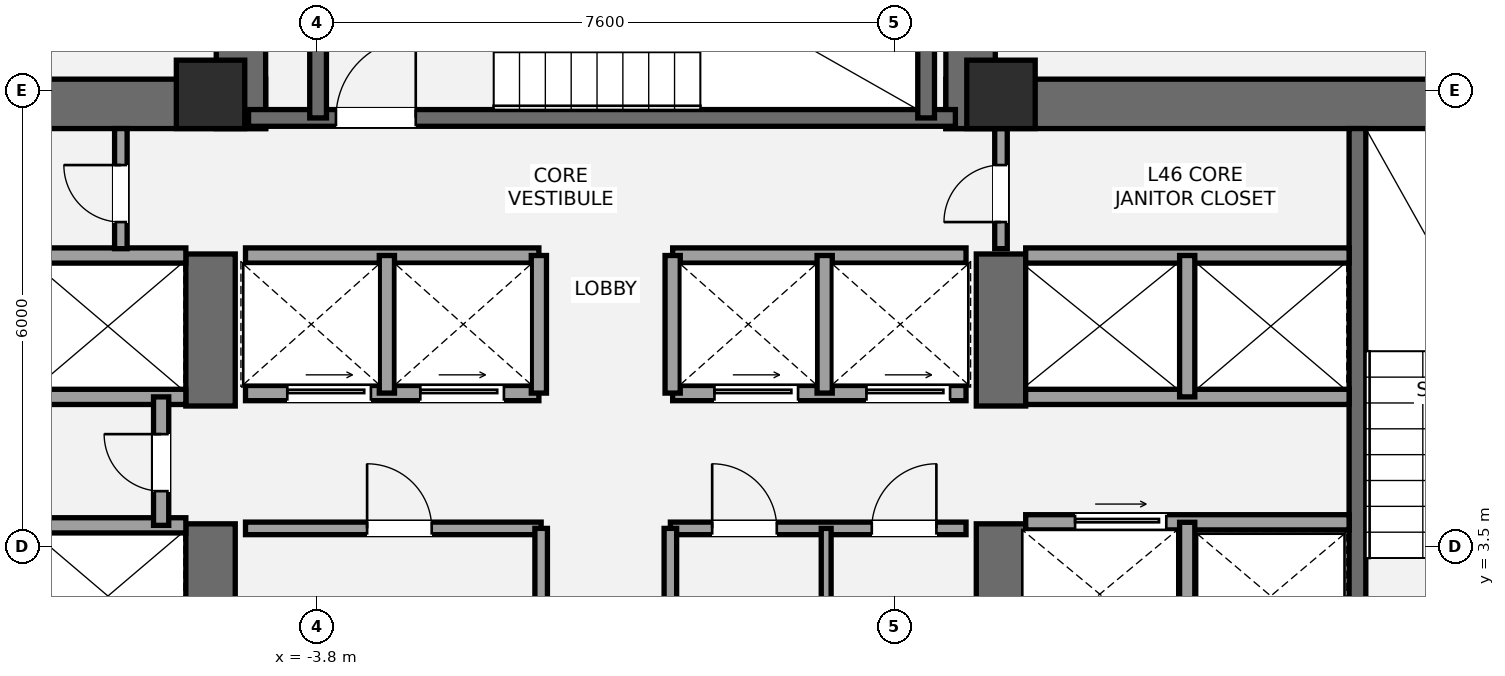
"""IFC4 building model, lengths in metres.
Left out: names, types, materials, properties, quantities, classifications, styles, units other than length and angle.
Written with IfcOpenShell. Run it as: python <this file> out.ifc"""

import sys

from ifc_helpers import new_model, si_unit, direction, frame, frame_2d, origin, origin_2d, place, context, subcontext, project, spatial, rectangle, extrude, element, fill, save


model = new_model("IFC4")
c1 = context("Model", 3, precision=1e-05, world=origin(), true_north=direction((0.0, 1.0)))
c2 = subcontext(c1, "Body", "Model", "MODEL_VIEW")
j1 = project(units=[si_unit("LENGTHUNIT", "METRE"), si_unit("PLANEANGLEUNIT", "RADIAN")], contexts=[c1])
p1 = place(None, origin())
s1 = spatial("IfcSite", under=j1, at=p1, CompositionType="ELEMENT")
p2 = place(p1, origin())
s2 = spatial("IfcBuilding", under=s1, at=p2, CompositionType="ELEMENT")
p3 = place(p2, frame((0.0, 0.0, 169.4)))
s3 = spatial("IfcBuildingStorey", under=s2, at=p3, CompositionType="ELEMENT", Elevation=169.4)
p4 = place(p3, frame((-13.8, 9.325, 0.0), z_axis=(0.0, 0.0, 1.0), x_axis=(1.0, 0.0, 0.0)))
e1 = element("IfcWall", 1, at=p4, inside=s3, PredefinedType="SHEAR", context=c2, shape_type="SweptSolid", body=[
    extrude(rectangle(XDim=9.325, YDim=0.65, at=frame_2d((4.663, 0.0))), origin(), (0.0, 0.0, 1.0), 3.2),
])
p5 = place(p3, frame((-5.2, 1.2, 0.0), z_axis=(0.0, 0.0, 1.0), x_axis=(0.0, 1.0, 0.0)))
e2 = element("IfcWall", 2, at=p5, inside=s3, PredefinedType="SHEAR", context=c2, shape_type="SweptSolid", body=[
    extrude(rectangle(XDim=2.6, YDim=0.65, at=frame_2d((1.3, 0.0))), origin(), (0.0, 0.0, 1.0), 3.2),
])
p6 = place(p3, frame((-5.2, 5.35, 0.0), z_axis=(0.0, 0.0, 1.0), x_axis=(0.0, 1.0, 0.0)))
e3 = element("IfcWall", 3, at=p6, inside=s3, PredefinedType="SHEAR", context=c2, shape_type="SweptSolid", body=[
    extrude(rectangle(XDim=2.0, YDim=0.65, at=frame_2d((1.0, 0.0))), origin(), (0.0, 0.0, 1.0), 3.2),
])
p7 = place(p3, frame((4.475, 9.325, 0.0), z_axis=(0.0, 0.0, 1.0), x_axis=(1.0, 0.0, 0.0)))
e4 = element("IfcWall", 4, at=p7, inside=s3, PredefinedType="SHEAR", context=c2, shape_type="SweptSolid", body=[
    extrude(rectangle(XDim=9.325, YDim=0.65, at=frame_2d((4.663, 0.0))), origin(), (0.0, 0.0, 1.0), 3.2),
])
p8 = place(p3, frame((5.2, 1.2, 0.0), z_axis=(0.0, 0.0, 1.0), x_axis=(0.0, 1.0, 0.0)))
e5 = element("IfcWall", 5, at=p8, inside=s3, PredefinedType="SHEAR", context=c2, shape_type="SweptSolid", body=[
    extrude(rectangle(XDim=2.6, YDim=0.65, at=frame_2d((1.3, 0.0))), origin(), (0.0, 0.0, 1.0), 3.2),
])
p9 = place(p3, frame((5.2, 5.35, 0.0), z_axis=(0.0, 0.0, 1.0), x_axis=(0.0, 1.0, 0.0)))
e6 = element("IfcWall", 6, at=p9, inside=s3, PredefinedType="SHEAR", context=c2, shape_type="SweptSolid", body=[
    extrude(rectangle(XDim=2.0, YDim=0.65, at=frame_2d((1.0, 0.0))), origin(), (0.0, 0.0, 1.0), 3.2),
])
p10 = place(p3, frame((9.89, 1.85, 0.0), z_axis=(0.0, 0.0, 1.0), x_axis=(0.0, 1.0, 0.0)))
e7 = element("IfcWall", 7, at=p10, inside=s3, PredefinedType="SHEAR", context=c2, shape_type="SweptSolid", body=[
    extrude(rectangle(XDim=7.15, YDim=0.22, at=frame_2d((3.575, 0.0))), origin(), (0.0, 0.0, 1.0), 3.2),
])
for number, where, z_axis, x_axis in (
    (8, (-4.8, 9.0, 0.0), (0.0, 0.0, 1.0), (0.0, 1.0, 0.0)),
    (9, (4.8, 9.0, 0.0), (0.0, 0.0, 1.0), (0.0, 1.0, 0.0)),
):
    element("IfcWall", number, at=place(p3, frame(where, z_axis=z_axis, x_axis=x_axis)), inside=s3, PredefinedType="SHEAR", context=c2, shape_type="SweptSolid", body=[
        extrude(rectangle(XDim=4.05, YDim=0.65, at=frame_2d((2.025, 0.0))), origin(), (0.0, 0.0, 1.0), 3.2),
    ])
p11 = place(p3, frame((-4.7, 9.14, 0.0), z_axis=(0.0, 0.0, 1.0), x_axis=(1.0, 0.0, 0.0)))
e10 = element("IfcWall", 10, at=p11, inside=s3, PredefinedType="SHEAR", context=c2, shape_type="SweptSolid", body=[
    extrude(rectangle(XDim=9.3, YDim=0.22, at=frame_2d((4.65, 0.0))), origin(), (0.0, 0.0, 1.0), 3.2),
])
p12 = place(p11, frame((1.15, 0.0, 0.0)))
e11 = element("IfcOpeningElement", 11, at=p12, cuts=e10, PredefinedType="OPENING", context=c2, shape_type="SweptSolid", body=[
    extrude(rectangle(XDim=1.05, YDim=2.15, at=frame_2d((0.525, 1.075))), frame((0.0, 0.12, 0.0), z_axis=(0.0, -1.0, 0.0), x_axis=(1.0, 0.0, 0.0)), (0.0, 0.0, 1.0), 0.24),
])
for number, where, z_axis, x_axis in (
    (12, (-3.785, 9.14, 0.0), (0.0, 0.0, 1.0), (0.0, 1.0, 0.0)),
    (13, (4.215, 9.14, 0.0), (0.0, 0.0, 1.0), (0.0, 1.0, 0.0)),
):
    element("IfcWall", number, at=place(p3, frame(where, z_axis=z_axis, x_axis=x_axis)), inside=s3, PredefinedType="SHEAR", context=c2, shape_type="SweptSolid", body=[
        extrude(rectangle(XDim=3.26, YDim=0.22, at=frame_2d((1.63, 0.0))), origin(), (0.0, 0.0, 1.0), 3.2),
    ])
for number, where, z_axis, x_axis in (
    (14, (-5.2, 9.45, 0.0), (0.0, 0.0, 1.0), (1.0, 0.0, 0.0)),
    (15, (5.2, 9.45, 0.0), (0.0, 0.0, 1.0), (1.0, 0.0, 0.0)),
):
    element("IfcColumn", number, at=place(p3, frame(where, z_axis=z_axis, x_axis=x_axis)), inside=s3, PredefinedType="COLUMN", context=c2, shape_type="SweptSolid", body=[
        extrude(rectangle(XDim=0.9, YDim=0.9, at=origin_2d()), origin(), (0.0, 0.0, 1.0), 3.2),
    ])
for number, where, z_axis, x_axis in (
    (16, (-9.78, 3.78, 0.0), (0.0, 0.0, 1.0), (1.0, 0.0, 0.0)),
    (17, (-9.78, 5.47, 0.0), (0.0, 0.0, 1.0), (1.0, 0.0, 0.0)),
    (18, (-9.78, 7.33, 0.0), (0.0, 0.0, 1.0), (1.0, 0.0, 0.0)),
):
    element("IfcWall", number, at=place(p3, frame(where, z_axis=z_axis, x_axis=x_axis)), inside=s3, PredefinedType="SOLIDWALL", context=c2, shape_type="SweptSolid", body=[
        extrude(rectangle(XDim=4.255, YDim=0.2, at=frame_2d((2.127, 0.0))), origin(), (0.0, 0.0, 1.0), 3.02),
    ])
p13 = place(p3, frame((-5.85, 3.78, 0.0), z_axis=(0.0, 0.0, 1.0), x_axis=(0.0, 1.0, 0.0)))
e19 = element("IfcWall", 19, at=p13, inside=s3, PredefinedType="SOLIDWALL", context=c2, shape_type="SweptSolid", body=[
    extrude(rectangle(XDim=1.69, YDim=0.2, at=frame_2d((0.845, 0.0))), origin(), (0.0, 0.0, 1.0), 3.02),
])
p14 = place(p13, frame((0.45, 0.0, 0.0)))
e20 = element("IfcOpeningElement", 20, at=p14, cuts=e19, PredefinedType="OPENING", context=c2, shape_type="SweptSolid", body=[
    extrude(rectangle(XDim=0.75, YDim=2.1, at=frame_2d((0.375, 1.05))), frame((0.0, 0.11, 0.0), z_axis=(0.0, -1.0, 0.0), x_axis=(1.0, 0.0, 0.0)), (0.0, 0.0, 1.0), 0.22),
])
p15 = place(p3, frame((5.525, 3.82, 0.0), z_axis=(0.0, 0.0, 1.0), x_axis=(1.0, 0.0, 0.0)))
e21 = element("IfcWall", 21, at=p15, inside=s3, PredefinedType="SOLIDWALL", context=c2, shape_type="SweptSolid", body=[
    extrude(rectangle(XDim=4.255, YDim=0.2, at=frame_2d((2.127, 0.0))), origin(), (0.0, 0.0, 1.0), 3.02),
])
p16 = place(p15, frame((0.65, 0.0, 0.0)))
e22 = element("IfcOpeningElement", 22, at=p16, cuts=e21, PredefinedType="OPENING", context=c2, shape_type="SweptSolid", body=[
    extrude(rectangle(XDim=1.2, YDim=2.2, at=frame_2d((0.6, 1.1))), frame((0.0, 0.11, 0.0), z_axis=(0.0, -1.0, 0.0), x_axis=(1.0, 0.0, 0.0)), (0.0, 0.0, 1.0), 0.22),
])
p17 = place(p3, frame((7.65, 1.85, 0.0), z_axis=(0.0, 0.0, 1.0), x_axis=(0.0, 1.0, 0.0)))
e23 = element("IfcWall", 23, at=p17, inside=s3, PredefinedType="SOLIDWALL", context=c2, shape_type="SweptSolid", body=[
    extrude(rectangle(XDim=1.97, YDim=0.2, at=frame_2d((0.985, 0.0))), origin(), (0.0, 0.0, 1.0), 3.02),
])
for number, where, z_axis, x_axis in (
    (24, (5.525, 5.47, 0.0), (0.0, 0.0, 1.0), (1.0, 0.0, 0.0)),
    (25, (5.525, 7.33, 0.0), (0.0, 0.0, 1.0), (1.0, 0.0, 0.0)),
):
    element("IfcWall", number, at=place(p3, frame(where, z_axis=z_axis, x_axis=x_axis)), inside=s3, PredefinedType="SOLIDWALL", context=c2, shape_type="SweptSolid", body=[
        extrude(rectangle(XDim=4.255, YDim=0.2, at=frame_2d((2.127, 0.0))), origin(), (0.0, 0.0, 1.0), 3.02),
    ])
p18 = place(p3, frame((7.65, 5.47, 0.0), z_axis=(0.0, 0.0, 1.0), x_axis=(0.0, 1.0, 0.0)))
e26 = element("IfcWall", 26, at=p18, inside=s3, PredefinedType="SOLIDWALL", context=c2, shape_type="SweptSolid", body=[
    extrude(rectangle(XDim=1.86, YDim=0.2, at=frame_2d((0.93, 0.0))), origin(), (0.0, 0.0, 1.0), 3.02),
])
p19 = place(p3, frame((-4.74, 3.74, 0.0), z_axis=(0.0, 0.0, 1.0), x_axis=(1.0, 0.0, 0.0)))
e27 = element("IfcWall", 27, at=p19, inside=s3, PredefinedType="PARTITIONING", context=c2, shape_type="SweptSolid", body=[
    extrude(rectangle(XDim=3.89, YDim=0.165, at=frame_2d((1.945, 0.0))), origin(), (0.0, 0.0, 1.0), 3.02),
])
p20 = place(p19, frame((1.6, 0.0, 0.0)))
e28 = element("IfcOpeningElement", 28, at=p20, cuts=e27, PredefinedType="OPENING", context=c2, shape_type="SweptSolid", body=[
    extrude(rectangle(XDim=0.85, YDim=2.1, at=frame_2d((0.425, 1.05))), frame((0.0, 0.093, 0.0), z_axis=(0.0, -1.0, 0.0), x_axis=(1.0, 0.0, 0.0)), (0.0, 0.0, 1.0), 0.185),
])
p21 = place(p3, frame((-0.85, 1.92, 0.0), z_axis=(0.0, 0.0, 1.0), x_axis=(0.0, 1.0, 0.0)))
e29 = element("IfcWall", 29, at=p21, inside=s3, PredefinedType="PARTITIONING", context=c2, shape_type="SweptSolid", body=[
    extrude(rectangle(XDim=1.82, YDim=0.165, at=frame_2d((0.91, 0.0))), origin(), (0.0, 0.0, 1.0), 3.02),
])
p22 = place(p3, frame((0.85, 3.74, 0.0), z_axis=(0.0, 0.0, 1.0), x_axis=(1.0, 0.0, 0.0)))
e30 = element("IfcWall", 30, at=p22, inside=s3, PredefinedType="PARTITIONING", context=c2, shape_type="SweptSolid", body=[
    extrude(rectangle(XDim=3.89, YDim=0.165, at=frame_2d((1.945, 0.0))), origin(), (0.0, 0.0, 1.0), 3.02),
])
p23 = place(p22, frame((0.55, 0.0, 0.0)))
e31 = element("IfcOpeningElement", 31, at=p23, cuts=e30, PredefinedType="OPENING", context=c2, shape_type="SweptSolid", body=[
    extrude(rectangle(XDim=0.85, YDim=2.1, at=frame_2d((0.425, 1.05))), frame((0.0, 0.093, 0.0), z_axis=(0.0, -1.0, 0.0), x_axis=(1.0, 0.0, 0.0)), (0.0, 0.0, 1.0), 0.185),
])
p24 = place(p22, frame((2.65, 0.0, 0.0)))
e32 = element("IfcOpeningElement", 32, at=p24, cuts=e30, PredefinedType="OPENING", context=c2, shape_type="SweptSolid", body=[
    extrude(rectangle(XDim=0.85, YDim=2.1, at=frame_2d((0.425, 1.05))), frame((0.0, 0.093, 0.0), z_axis=(0.0, -1.0, 0.0), x_axis=(1.0, 0.0, 0.0)), (0.0, 0.0, 1.0), 0.185),
])
p25 = place(p3, frame((0.85, 1.92, 0.0), z_axis=(0.0, 0.0, 1.0), x_axis=(0.0, 1.0, 0.0)))
e33 = element("IfcWall", 33, at=p25, inside=s3, PredefinedType="PARTITIONING", context=c2, shape_type="SweptSolid", body=[
    extrude(rectangle(XDim=1.82, YDim=0.165, at=frame_2d((0.91, 0.0))), origin(), (0.0, 0.0, 1.0), 3.02),
])
p26 = place(p3, frame((2.9, 1.92, 0.0), z_axis=(0.0, 0.0, 1.0), x_axis=(0.0, 1.0, 0.0)))
e34 = element("IfcWall", 34, at=p26, inside=s3, PredefinedType="PARTITIONING", context=c2, shape_type="SweptSolid", body=[
    extrude(rectangle(XDim=1.82, YDim=0.13, at=frame_2d((0.91, 0.0))), origin(), (0.0, 0.0, 1.0), 3.02),
])
p27 = place(p3, frame((-4.74, 5.52, 0.0), z_axis=(0.0, 0.0, 1.0), x_axis=(1.0, 0.0, 0.0)))
e35 = element("IfcWall", 35, at=p27, inside=s3, PredefinedType="SOLIDWALL", context=c2, shape_type="SweptSolid", body=[
    extrude(rectangle(XDim=3.86, YDim=0.2, at=frame_2d((1.93, 0.0))), origin(), (0.0, 0.0, 1.0), 3.02),
])
p28 = place(p27, frame((0.55, 0.0, 0.0)))
e36 = element("IfcOpeningElement", 36, at=p28, cuts=e35, PredefinedType="OPENING", context=c2, shape_type="SweptSolid", body=[
    extrude(rectangle(XDim=1.1, YDim=2.2, at=frame_2d((0.55, 1.1))), frame((0.0, 0.11, 0.0), z_axis=(0.0, -1.0, 0.0), x_axis=(1.0, 0.0, 0.0)), (0.0, 0.0, 1.0), 0.22),
])
p29 = place(p27, frame((2.3, 0.0, 0.0)))
e37 = element("IfcOpeningElement", 37, at=p29, cuts=e35, PredefinedType="OPENING", context=c2, shape_type="SweptSolid", body=[
    extrude(rectangle(XDim=1.1, YDim=2.2, at=frame_2d((0.55, 1.1))), frame((0.0, 0.11, 0.0), z_axis=(0.0, -1.0, 0.0), x_axis=(1.0, 0.0, 0.0)), (0.0, 0.0, 1.0), 0.22),
])
p30 = place(p3, frame((0.88, 5.52, 0.0), z_axis=(0.0, 0.0, 1.0), x_axis=(1.0, 0.0, 0.0)))
e38 = element("IfcWall", 38, at=p30, inside=s3, PredefinedType="SOLIDWALL", context=c2, shape_type="SweptSolid", body=[
    extrude(rectangle(XDim=3.86, YDim=0.2, at=frame_2d((1.93, 0.0))), origin(), (0.0, 0.0, 1.0), 3.02),
])
p31 = place(p30, frame((0.55, 0.0, 0.0)))
e39 = element("IfcOpeningElement", 39, at=p31, cuts=e38, PredefinedType="OPENING", context=c2, shape_type="SweptSolid", body=[
    extrude(rectangle(XDim=1.1, YDim=2.2, at=frame_2d((0.55, 1.1))), frame((0.0, 0.11, 0.0), z_axis=(0.0, -1.0, 0.0), x_axis=(1.0, 0.0, 0.0)), (0.0, 0.0, 1.0), 0.22),
])
p32 = place(p30, frame((2.55, 0.0, 0.0)))
e40 = element("IfcOpeningElement", 40, at=p32, cuts=e38, PredefinedType="OPENING", context=c2, shape_type="SweptSolid", body=[
    extrude(rectangle(XDim=1.1, YDim=2.2, at=frame_2d((0.55, 1.1))), frame((0.0, 0.11, 0.0), z_axis=(0.0, -1.0, 0.0), x_axis=(1.0, 0.0, 0.0)), (0.0, 0.0, 1.0), 0.22),
])
for number, where, z_axis, x_axis in (
    (41, (-4.74, 7.33, 0.0), (0.0, 0.0, 1.0), (1.0, 0.0, 0.0)),
    (42, (0.88, 7.33, 0.0), (0.0, 0.0, 1.0), (1.0, 0.0, 0.0)),
):
    element("IfcWall", number, at=place(p3, frame(where, z_axis=z_axis, x_axis=x_axis)), inside=s3, PredefinedType="SOLIDWALL", context=c2, shape_type="SweptSolid", body=[
        extrude(rectangle(XDim=3.86, YDim=0.2, at=frame_2d((1.93, 0.0))), origin(), (0.0, 0.0, 1.0), 3.02),
    ])
for number, where, z_axis, x_axis in (
    (43, (-2.88, 5.52, 0.0), (0.0, 0.0, 1.0), (0.0, 1.0, 0.0)),
    (44, (2.88, 5.52, 0.0), (0.0, 0.0, 1.0), (0.0, 1.0, 0.0)),
    (45, (-0.88, 5.52, 0.0), (0.0, 0.0, 1.0), (0.0, 1.0, 0.0)),
    (46, (0.88, 5.52, 0.0), (0.0, 0.0, 1.0), (0.0, 1.0, 0.0)),
):
    element("IfcWall", number, at=place(p3, frame(where, z_axis=z_axis, x_axis=x_axis)), inside=s3, PredefinedType="SOLIDWALL", context=c2, shape_type="SweptSolid", body=[
        extrude(rectangle(XDim=1.81, YDim=0.2, at=frame_2d((0.905, 0.0))), origin(), (0.0, 0.0, 1.0), 3.02),
    ])
p33 = place(p3, frame((-6.38, 7.42, 0.0), z_axis=(0.0, 0.0, 1.0), x_axis=(0.0, 1.0, 0.0)))
e47 = element("IfcWall", 47, at=p33, inside=s3, PredefinedType="PARTITIONING", context=c2, shape_type="SweptSolid", body=[
    extrude(rectangle(XDim=1.58, YDim=0.165, at=frame_2d((0.79, 0.0))), origin(), (0.0, 0.0, 1.0), 3.02),
])
p34 = place(p33, frame((0.35, 0.0, 0.0)))
e48 = element("IfcOpeningElement", 48, at=p34, cuts=e47, PredefinedType="OPENING", context=c2, shape_type="SweptSolid", body=[
    extrude(rectangle(XDim=0.75, YDim=2.1, at=frame_2d((0.375, 1.05))), frame((0.0, 0.093, 0.0), z_axis=(0.0, -1.0, 0.0), x_axis=(1.0, 0.0, 0.0)), (0.0, 0.0, 1.0), 0.185),
])
p35 = place(p3, frame((5.2, 7.42, 0.0), z_axis=(0.0, 0.0, 1.0), x_axis=(0.0, 1.0, 0.0)))
e49 = element("IfcWall", 49, at=p35, inside=s3, PredefinedType="PARTITIONING", context=c2, shape_type="SweptSolid", body=[
    extrude(rectangle(XDim=1.58, YDim=0.165, at=frame_2d((0.79, 0.0))), origin(), (0.0, 0.0, 1.0), 3.02),
])
p36 = place(p35, frame((0.35, 0.0, 0.0)))
e50 = element("IfcOpeningElement", 50, at=p36, cuts=e49, PredefinedType="OPENING", context=c2, shape_type="SweptSolid", body=[
    extrude(rectangle(XDim=0.75, YDim=2.1, at=frame_2d((0.375, 1.05))), frame((0.0, 0.093, 0.0), z_axis=(0.0, -1.0, 0.0), x_axis=(1.0, 0.0, 0.0)), (0.0, 0.0, 1.0), 0.185),
])
p37 = place(p12, origin())
e51 = element("IfcDoor", 51, at=p37, inside=s3, OperationType="SINGLE_SWING_RIGHT", PredefinedType="DOOR", context=c2, shape_type="SweptSolid", body=[
    extrude(rectangle(XDim=1.05, YDim=2.15, at=frame_2d((0.525, 1.075))), frame((0.0, 0.025, 0.0), z_axis=(0.0, -1.0, 0.0), x_axis=(1.0, 0.0, 0.0)), (0.0, 0.0, 1.0), 0.05),
])
fill(e11, e51)
p38 = place(p14, origin())
e52 = element("IfcDoor", 52, at=p38, inside=s3, OperationType="SINGLE_SWING_RIGHT", PredefinedType="DOOR", context=c2, shape_type="SweptSolid", body=[
    extrude(rectangle(XDim=0.75, YDim=2.1, at=frame_2d((0.375, 1.05))), frame((0.0, 0.025, 0.0), z_axis=(0.0, -1.0, 0.0), x_axis=(1.0, 0.0, 0.0)), (0.0, 0.0, 1.0), 0.05),
])
fill(e20, e52)
p39 = place(p16, origin())
e53 = element("IfcDoor", 53, at=p39, inside=s3, OperationType="SLIDING_TO_RIGHT", PredefinedType="DOOR", context=c2, shape_type="SweptSolid", body=[
    extrude(rectangle(XDim=1.2, YDim=2.2, at=frame_2d((0.6, 1.1))), frame((0.0, 0.025, 0.0), z_axis=(0.0, -1.0, 0.0), x_axis=(1.0, 0.0, 0.0)), (0.0, 0.0, 1.0), 0.05),
])
fill(e22, e53)
p40 = place(p20, origin())
e54 = element("IfcDoor", 54, at=p40, inside=s3, OperationType="SINGLE_SWING_LEFT", PredefinedType="DOOR", context=c2, shape_type="SweptSolid", body=[
    extrude(rectangle(XDim=0.85, YDim=2.1, at=frame_2d((0.425, 1.05))), frame((0.0, 0.025, 0.0), z_axis=(0.0, -1.0, 0.0), x_axis=(1.0, 0.0, 0.0)), (0.0, 0.0, 1.0), 0.05),
])
fill(e28, e54)
p41 = place(p23, origin())
e55 = element("IfcDoor", 55, at=p41, inside=s3, OperationType="SINGLE_SWING_LEFT", PredefinedType="DOOR", context=c2, shape_type="SweptSolid", body=[
    extrude(rectangle(XDim=0.85, YDim=2.1, at=frame_2d((0.425, 1.05))), frame((0.0, 0.025, 0.0), z_axis=(0.0, -1.0, 0.0), x_axis=(1.0, 0.0, 0.0)), (0.0, 0.0, 1.0), 0.05),
])
fill(e31, e55)
p42 = place(p24, origin())
e56 = element("IfcDoor", 56, at=p42, inside=s3, OperationType="SINGLE_SWING_RIGHT", PredefinedType="DOOR", context=c2, shape_type="SweptSolid", body=[
    extrude(rectangle(XDim=0.85, YDim=2.1, at=frame_2d((0.425, 1.05))), frame((0.0, 0.025, 0.0), z_axis=(0.0, -1.0, 0.0), x_axis=(1.0, 0.0, 0.0)), (0.0, 0.0, 1.0), 0.05),
])
fill(e32, e56)
p43 = place(p28, origin())
e57 = element("IfcDoor", 57, at=p43, inside=s3, OperationType="SLIDING_TO_LEFT", PredefinedType="DOOR", context=c2, shape_type="SweptSolid", body=[
    extrude(rectangle(XDim=1.1, YDim=2.2, at=frame_2d((0.55, 1.1))), frame((0.0, 0.025, 0.0), z_axis=(0.0, -1.0, 0.0), x_axis=(1.0, 0.0, 0.0)), (0.0, 0.0, 1.0), 0.05),
])
fill(e36, e57)
p44 = place(p29, origin())
e58 = element("IfcDoor", 58, at=p44, inside=s3, OperationType="SLIDING_TO_LEFT", PredefinedType="DOOR", context=c2, shape_type="SweptSolid", body=[
    extrude(rectangle(XDim=1.1, YDim=2.2, at=frame_2d((0.55, 1.1))), frame((0.0, 0.025, 0.0), z_axis=(0.0, -1.0, 0.0), x_axis=(1.0, 0.0, 0.0)), (0.0, 0.0, 1.0), 0.05),
])
fill(e37, e58)
p45 = place(p31, origin())
e59 = element("IfcDoor", 59, at=p45, inside=s3, OperationType="SLIDING_TO_LEFT", PredefinedType="DOOR", context=c2, shape_type="SweptSolid", body=[
    extrude(rectangle(XDim=1.1, YDim=2.2, at=frame_2d((0.55, 1.1))), frame((0.0, 0.025, 0.0), z_axis=(0.0, -1.0, 0.0), x_axis=(1.0, 0.0, 0.0)), (0.0, 0.0, 1.0), 0.05),
])
fill(e39, e59)
p46 = place(p32, origin())
e60 = element("IfcDoor", 60, at=p46, inside=s3, OperationType="SLIDING_TO_LEFT", PredefinedType="DOOR", context=c2, shape_type="SweptSolid", body=[
    extrude(rectangle(XDim=1.1, YDim=2.2, at=frame_2d((0.55, 1.1))), frame((0.0, 0.025, 0.0), z_axis=(0.0, -1.0, 0.0), x_axis=(1.0, 0.0, 0.0)), (0.0, 0.0, 1.0), 0.05),
])
fill(e40, e60)
p47 = place(p34, origin())
e61 = element("IfcDoor", 61, at=p47, inside=s3, OperationType="SINGLE_SWING_RIGHT", PredefinedType="DOOR", context=c2, shape_type="SweptSolid", body=[
    extrude(rectangle(XDim=0.75, YDim=2.1, at=frame_2d((0.375, 1.05))), frame((0.0, 0.025, 0.0), z_axis=(0.0, -1.0, 0.0), x_axis=(1.0, 0.0, 0.0)), (0.0, 0.0, 1.0), 0.05),
])
fill(e48, e61)
p48 = place(p36, origin())
e62 = element("IfcDoor", 62, at=p48, inside=s3, OperationType="SINGLE_SWING_LEFT", PredefinedType="DOOR", context=c2, shape_type="SweptSolid", body=[
    extrude(rectangle(XDim=0.75, YDim=2.1, at=frame_2d((0.375, 1.05))), frame((0.0, 0.025, 0.0), z_axis=(0.0, -1.0, 0.0), x_axis=(1.0, 0.0, 0.0)), (0.0, 0.0, 1.0), 0.05),
])
fill(e50, e62)
save(model, sys.argv[1])
